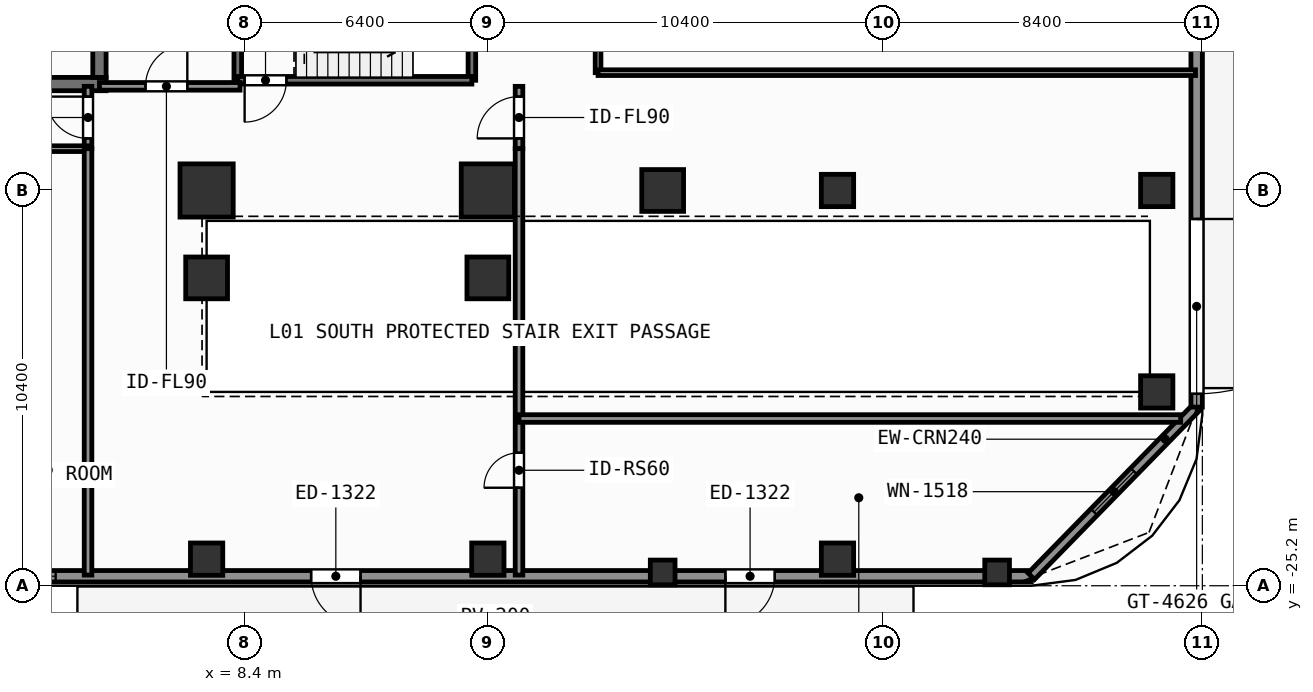
"""IFC4 building model, lengths in metres.
Left out: names, types, materials, properties, quantities, classifications, styles, units other than length and angle.
Written with IfcOpenShell. Run it as: python <this file> out.ifc"""

import sys

from ifc_helpers import new_model, si_unit, direction, frame, frame_2d, origin, origin_2d, place, context, subcontext, project, spatial, rectangle, extrude, element, fill, save


model = new_model("IFC4")
c1 = context("Model", 3, precision=1e-05, world=origin(), true_north=direction((0.0, 1.0)))
c2 = subcontext(c1, "Body", "Model", "MODEL_VIEW")
j1 = project(units=[si_unit("LENGTHUNIT", "METRE"), si_unit("PLANEANGLEUNIT", "RADIAN")], contexts=[c1])
p1 = place(None, origin())
s1 = spatial("IfcSite", under=j1, at=p1, CompositionType="ELEMENT")
p2 = place(p1, origin())
s2 = spatial("IfcBuilding", under=s1, at=p2, CompositionType="ELEMENT")
p3 = place(p2, origin())
s3 = spatial("IfcBuildingStorey", under=s2, at=p3, CompositionType="ELEMENT", Elevation=0.0)
p4 = place(p3, frame((-2.555, -12.0, 0.0), z_axis=(0.0, 0.0, 1.0), x_axis=(1.0, 0.0, 0.0)))
e1 = element("IfcWall", 1, at=p4, inside=s3, PredefinedType="SHEAR", context=c2, shape_type="SweptSolid", body=[
    extrude(rectangle(XDim=7.31, YDim=0.35, at=frame_2d((3.655, 0.0))), origin(), (0.0, 0.0, 1.0), 4.8),
])
p5 = place(p3, frame((4.58, -8.9, 0.0), z_axis=(0.0, 0.0, 1.0), x_axis=(0.0, -1.0, 0.0)))
e2 = element("IfcWall", 2, at=p5, inside=s3, PredefinedType="SHEAR", context=c2, shape_type="SweptSolid", body=[
    extrude(rectangle(XDim=2.925, YDim=0.35, at=frame_2d((1.462, 0.0))), origin(), (0.0, 0.0, 1.0), 4.8),
])
p6 = place(p5, frame((0.913, 0.0, 0.0)))
e3 = element("IfcOpeningElement", 3, at=p6, cuts=e2, PredefinedType="OPENING", context=c2, shape_type="SweptSolid", body=[
    extrude(rectangle(XDim=1.1, YDim=2.15, at=frame_2d((0.55, 1.075))), frame((0.0, 0.185, 0.0), z_axis=(0.0, -1.0, 0.0), x_axis=(1.0, 0.0, 0.0)), (0.0, 0.0, 1.0), 0.37),
])
for number, where, z_axis, x_axis in (
    (4, (7.4, -14.8, 0.0), (0.0, 0.0, 1.0), (1.0, 0.0, 0.0)),
    (5, (14.8, -14.8, 0.0), (0.0, 0.0, 1.0), (1.0, 0.0, 0.0)),
):
    element("IfcColumn", number, at=place(p3, frame(where, z_axis=z_axis, x_axis=x_axis)), inside=s3, PredefinedType="COLUMN", context=c2, shape_type="SweptSolid", body=[
        extrude(rectangle(XDim=1.4, YDim=1.4, at=origin_2d()), origin(), (0.0, 0.0, 1.0), 4.8),
    ])
for number, where, z_axis, x_axis in (
    (6, (19.4, -14.8, 0.0), (0.0, 0.0, 1.0), (1.0, 0.0, 0.0)),
    (7, (7.4, -17.1, 0.0), (0.0, 0.0, 1.0), (1.0, 0.0, 0.0)),
    (8, (14.8, -17.1, 0.0), (0.0, 0.0, 1.0), (1.0, 0.0, 0.0)),
):
    element("IfcColumn", number, at=place(p3, frame(where, z_axis=z_axis, x_axis=x_axis)), inside=s3, PredefinedType="COLUMN", context=c2, shape_type="SweptSolid", body=[
        extrude(rectangle(XDim=1.1, YDim=1.1, at=origin_2d()), origin(), (0.0, 0.0, 1.0), 4.8),
    ])
for number, where, z_axis, x_axis in (
    (9, (7.4, -24.5, 0.0), (0.0, 0.0, 1.0), (1.0, 0.0, 0.0)),
    (10, (14.8, -24.5, 0.0), (0.0, 0.0, 1.0), (1.0, 0.0, 0.0)),
    (11, (24.0, -24.5, 0.0), (0.0, 0.0, 1.0), (1.0, 0.0, 0.0)),
    (12, (24.0, -14.8, 0.0), (0.0, 0.0, 1.0), (1.0, 0.0, 0.0)),
    (13, (32.4, -14.8, 0.0), (0.0, 0.0, 1.0), (1.0, 0.0, 0.0)),
    (14, (32.4, -20.1, 0.0), (0.0, 0.0, 1.0), (1.0, 0.0, 0.0)),
):
    element("IfcColumn", number, at=place(p3, frame(where, z_axis=z_axis, x_axis=x_axis)), inside=s3, PredefinedType="COLUMN", context=c2, shape_type="SweptSolid", body=[
        extrude(rectangle(XDim=0.85, YDim=0.85, at=origin_2d()), origin(), (0.0, 0.0, 1.0), 4.8),
    ])
for number, where, z_axis, x_axis in (
    (15, (19.4, -24.85, 0.0), (0.0, 0.0, 1.0), (1.0, 0.0, 0.0)),
    (16, (28.2, -24.85, 0.0), (0.0, 0.0, 1.0), (1.0, 0.0, 0.0)),
):
    element("IfcColumn", number, at=place(p3, frame(where, z_axis=z_axis, x_axis=x_axis)), inside=s3, PredefinedType="PILASTER", context=c2, shape_type="SweptSolid", body=[
        extrude(rectangle(XDim=0.65, YDim=0.65, at=origin_2d()), origin(), (0.0, 0.0, 1.0), 4.8),
    ])
p7 = place(p3, frame((29.1, -24.95, 0.0), z_axis=(0.0, 0.0, 1.0), x_axis=(-1.0, 0.0, 0.0)))
e17 = element("IfcWall", 17, at=p7, inside=s3, PredefinedType="SOLIDWALL", context=c2, shape_type="SweptSolid", body=[
    extrude(rectangle(XDim=58.2, YDim=0.3, at=frame_2d((29.1, 0.0))), origin(), (0.0, 0.0, 1.0), 4.56),
])
p8 = place(p7, frame((39.26, 0.0, 0.85)))
e18 = element("IfcOpeningElement", 18, at=p8, cuts=e17, PredefinedType="OPENING", context=c2, shape_type="SweptSolid", body=[
    extrude(rectangle(XDim=2.1, YDim=2.2, at=frame_2d((1.05, 1.1))), frame((0.0, 0.16, 0.0), z_axis=(0.0, -1.0, 0.0), x_axis=(1.0, 0.0, 0.0)), (0.0, 0.0, 1.0), 0.32),
])
p9 = place(p7, frame((31.75, 0.0, 0.85)))
e19 = element("IfcOpeningElement", 19, at=p9, cuts=e17, PredefinedType="OPENING", context=c2, shape_type="SweptSolid", body=[
    extrude(rectangle(XDim=2.1, YDim=2.2, at=frame_2d((1.05, 1.1))), frame((0.0, 0.16, 0.0), z_axis=(0.0, -1.0, 0.0), x_axis=(1.0, 0.0, 0.0)), (0.0, 0.0, 1.0), 0.32),
])
p10 = place(p7, frame((25.672, 0.0, 0.85)))
e20 = element("IfcOpeningElement", 20, at=p10, cuts=e17, PredefinedType="OPENING", context=c2, shape_type="SweptSolid", body=[
    extrude(rectangle(XDim=2.1, YDim=2.2, at=frame_2d((1.05, 1.1))), frame((0.0, 0.16, 0.0), z_axis=(0.0, -1.0, 0.0), x_axis=(1.0, 0.0, 0.0)), (0.0, 0.0, 1.0), 0.32),
])
p11 = place(p7, frame((17.65, 0.0, 0.0)))
e21 = element("IfcOpeningElement", 21, at=p11, cuts=e17, PredefinedType="OPENING", context=c2, shape_type="SweptSolid", body=[
    extrude(rectangle(XDim=1.3, YDim=2.2, at=frame_2d((0.65, 1.1))), frame((0.0, 0.16, 0.0), z_axis=(0.0, -1.0, 0.0), x_axis=(1.0, 0.0, 0.0)), (0.0, 0.0, 1.0), 0.32),
])
p12 = place(p7, frame((6.75, 0.0, 0.0)))
e22 = element("IfcOpeningElement", 22, at=p12, cuts=e17, PredefinedType="OPENING", context=c2, shape_type="SweptSolid", body=[
    extrude(rectangle(XDim=1.3, YDim=2.2, at=frame_2d((0.65, 1.1))), frame((0.0, 0.16, 0.0), z_axis=(0.0, -1.0, 0.0), x_axis=(1.0, 0.0, 0.0)), (0.0, 0.0, 1.0), 0.32),
])
p13 = place(p7, frame((45.95, 0.0, 0.0)))
e23 = element("IfcOpeningElement", 23, at=p13, cuts=e17, PredefinedType="OPENING", context=c2, shape_type="SweptSolid", body=[
    extrude(rectangle(XDim=1.3, YDim=2.2, at=frame_2d((0.65, 1.1))), frame((0.0, 0.16, 0.0), z_axis=(0.0, -1.0, 0.0), x_axis=(1.0, 0.0, 0.0)), (0.0, 0.0, 1.0), 0.32),
])
p14 = place(p3, frame((33.45, -20.5, 0.0), z_axis=(0.0, 0.0, 1.0), x_axis=(-0.69901822973, -0.715103848756, 0.0)))
e24 = element("IfcWall", 24, at=p14, inside=s3, PredefinedType="SOLIDWALL", context=c2, shape_type="SweptSolid", body=[
    extrude(rectangle(XDim=6.223, YDim=0.24, at=frame_2d((3.111, 0.0))), origin(), (0.0, 0.0, 1.0), 4.56),
])
p15 = place(p14, frame((2.362, 0.0, 0.85)))
e25 = element("IfcOpeningElement", 25, at=p15, cuts=e24, PredefinedType="OPENING", context=c2, shape_type="SweptSolid", body=[
    extrude(rectangle(XDim=1.5, YDim=1.85, at=frame_2d((0.75, 0.925))), frame((0.0, 0.13, 0.0), z_axis=(0.0, -1.0, 0.0), x_axis=(1.0, 0.0, 0.0)), (0.0, 0.0, 1.0), 0.26),
])
p16 = place(p3, frame((33.45, 20.5, 0.0), z_axis=(0.0, 0.0, 1.0), x_axis=(0.0, -1.0, 0.0)))
e26 = element("IfcWall", 26, at=p16, inside=s3, PredefinedType="SOLIDWALL", context=c2, shape_type="SweptSolid", body=[
    extrude(rectangle(XDim=41.0, YDim=0.3, at=frame_2d((20.5, 0.0))), origin(), (0.0, 0.0, 1.0), 4.56),
])
p17 = place(p16, frame((23.1, 0.0, 0.0)))
e27 = element("IfcOpeningElement", 27, at=p17, cuts=e26, PredefinedType="OPENING", context=c2, shape_type="SweptSolid", body=[
    extrude(rectangle(XDim=2.0, YDim=2.4, at=frame_2d((1.0, 1.2))), frame((0.0, 0.16, 0.0), z_axis=(0.0, -1.0, 0.0), x_axis=(1.0, 0.0, 0.0)), (0.0, 0.0, 1.0), 0.32),
])
p18 = place(p16, frame((15.9, 0.0, 0.0)))
e28 = element("IfcOpeningElement", 28, at=p18, cuts=e26, PredefinedType="OPENING", context=c2, shape_type="SweptSolid", body=[
    extrude(rectangle(XDim=2.0, YDim=2.4, at=frame_2d((1.0, 1.2))), frame((0.0, 0.16, 0.0), z_axis=(0.0, -1.0, 0.0), x_axis=(1.0, 0.0, 0.0)), (0.0, 0.0, 1.0), 0.32),
])
p19 = place(p16, frame((36.05, 0.0, 0.0)))
e29 = element("IfcOpeningElement", 29, at=p19, cuts=e26, PredefinedType="OPENING", context=c2, shape_type="SweptSolid", body=[
    extrude(rectangle(XDim=4.6, YDim=2.6, at=frame_2d((2.3, 1.3))), frame((0.0, 0.16, 0.0), z_axis=(0.0, -1.0, 0.0), x_axis=(1.0, 0.0, 0.0)), (0.0, 0.0, 1.0), 0.32),
])
p20 = place(p16, frame((6.95, 0.0, 0.0)))
e30 = element("IfcOpeningElement", 30, at=p20, cuts=e26, PredefinedType="OPENING", context=c2, shape_type="SweptSolid", body=[
    extrude(rectangle(XDim=1.3, YDim=2.2, at=frame_2d((0.65, 1.1))), frame((0.0, 0.16, 0.0), z_axis=(0.0, -1.0, 0.0), x_axis=(1.0, 0.0, 0.0)), (0.0, 0.0, 1.0), 0.32),
])
for number, where, z_axis, x_axis in (
    (31, (8.22, -11.9, 0.0), (0.0, 0.0, 1.0), (0.0, 1.0, 0.0)),
    (32, (14.38, -8.94, 0.0), (0.0, 0.0, 1.0), (0.0, -1.0, 0.0)),
):
    element("IfcWall", number, at=place(p3, frame(where, z_axis=z_axis, x_axis=x_axis)), inside=s3, PredefinedType="SHEAR", context=c2, shape_type="SweptSolid", body=[
        extrude(rectangle(XDim=2.96, YDim=0.2, at=frame_2d((1.48, 0.0))), origin(), (0.0, 0.0, 1.0), 4.56),
    ])
p21 = place(p3, frame((14.38, -11.9, 0.0), z_axis=(0.0, 0.0, 1.0), x_axis=(-1.0, 0.0, 0.0)))
e33 = element("IfcWall", 33, at=p21, inside=s3, PredefinedType="SHEAR", context=c2, shape_type="SweptSolid", body=[
    extrude(rectangle(XDim=6.16, YDim=0.2, at=frame_2d((3.08, 0.0))), origin(), (0.0, 0.0, 1.0), 4.56),
])
p22 = place(p21, frame((4.88, 0.0, 0.0)))
e34 = element("IfcOpeningElement", 34, at=p22, cuts=e33, PredefinedType="OPENING", context=c2, shape_type="SweptSolid", body=[
    extrude(rectangle(XDim=1.1, YDim=2.15, at=frame_2d((0.55, 1.075))), frame((0.0, 0.11, 0.0), z_axis=(0.0, -1.0, 0.0), x_axis=(1.0, 0.0, 0.0)), (0.0, 0.0, 1.0), 0.22),
])
p23 = place(p3, frame((4.58, -12.06, 0.0), z_axis=(0.0, 0.0, 1.0), x_axis=(1.0, 0.0, 0.0)))
e35 = element("IfcWall", 35, at=p23, inside=s3, PredefinedType="SOLIDWALL", context=c2, shape_type="SweptSolid", body=[
    extrude(rectangle(XDim=3.7, YDim=0.2, at=frame_2d((1.85, 0.0))), origin(), (0.0, 0.0, 1.0), 4.56),
])
p24 = place(p23, frame((1.212, 0.0, 0.0)))
e36 = element("IfcOpeningElement", 36, at=p24, cuts=e35, PredefinedType="OPENING", context=c2, shape_type="SweptSolid", body=[
    extrude(rectangle(XDim=1.1, YDim=2.15, at=frame_2d((0.55, 1.075))), frame((0.0, 0.11, 0.0), z_axis=(0.0, -1.0, 0.0), x_axis=(1.0, 0.0, 0.0)), (0.0, 0.0, 1.0), 0.22),
])
p25 = place(p3, frame((4.28, -13.7, 0.0), z_axis=(0.0, 0.0, 1.0), x_axis=(0.0, 1.0, 0.0)))
e37 = element("IfcWall", 37, at=p25, inside=s3, PredefinedType="SOLIDWALL", context=c2, shape_type="SweptSolid", body=[
    extrude(rectangle(XDim=1.64, YDim=0.2, at=frame_2d((0.82, 0.0))), origin(), (0.0, 0.0, 1.0), 4.56),
])
p26 = place(p25, frame((0.27, 0.0, 0.0)))
e38 = element("IfcOpeningElement", 38, at=p26, cuts=e37, PredefinedType="OPENING", context=c2, shape_type="SweptSolid", body=[
    extrude(rectangle(XDim=1.1, YDim=2.15, at=frame_2d((0.55, 1.075))), frame((0.0, 0.11, 0.0), z_axis=(0.0, -1.0, 0.0), x_axis=(1.0, 0.0, 0.0)), (0.0, 0.0, 1.0), 0.22),
])
p27 = place(p3, frame((15.62, -13.7, 0.0), z_axis=(0.0, 0.0, 1.0), x_axis=(0.0, 1.0, 0.0)))
e39 = element("IfcWall", 39, at=p27, inside=s3, PredefinedType="SOLIDWALL", context=c2, shape_type="SweptSolid", body=[
    extrude(rectangle(XDim=1.64, YDim=0.2, at=frame_2d((0.82, 0.0))), origin(), (0.0, 0.0, 1.0), 4.56),
])
p28 = place(p27, frame((0.27, 0.0, 0.0)))
e40 = element("IfcOpeningElement", 40, at=p28, cuts=e39, PredefinedType="OPENING", context=c2, shape_type="SweptSolid", body=[
    extrude(rectangle(XDim=1.1, YDim=2.15, at=frame_2d((0.55, 1.075))), frame((0.0, 0.11, 0.0), z_axis=(0.0, -1.0, 0.0), x_axis=(1.0, 0.0, 0.0)), (0.0, 0.0, 1.0), 0.22),
])
p29 = place(p3, frame((-8.12, -13.7, 0.0), z_axis=(0.0, 0.0, 1.0), x_axis=(1.0, 0.0, 0.0)))
e41 = element("IfcWall", 41, at=p29, inside=s3, PredefinedType="PARTITIONING", context=c2, shape_type="SweptSolid", body=[
    extrude(rectangle(XDim=12.4, YDim=0.15, at=frame_2d((6.2, 0.0))), origin(), (0.0, 0.0, 1.0), 4.56),
])
p30 = place(p29, frame((5.661, 0.0, 0.0)))
e42 = element("IfcOpeningElement", 42, at=p30, cuts=e41, PredefinedType="OPENING", context=c2, shape_type="SweptSolid", body=[
    extrude(rectangle(XDim=0.9, YDim=2.1, at=frame_2d((0.45, 1.05))), frame((0.0, 0.085, 0.0), z_axis=(0.0, -1.0, 0.0), x_axis=(1.0, 0.0, 0.0)), (0.0, 0.0, 1.0), 0.17),
])
p31 = place(p3, frame((15.62, -24.92, 0.0), z_axis=(0.0, 0.0, 1.0), x_axis=(0.0, 1.0, 0.0)))
e43 = element("IfcWall", 43, at=p31, inside=s3, PredefinedType="SOLIDWALL", context=c2, shape_type="SweptSolid", body=[
    extrude(rectangle(XDim=11.22, YDim=0.2, at=frame_2d((5.61, 0.0))), origin(), (0.0, 0.0, 1.0), 4.56),
])
p32 = place(p31, frame((2.299, 0.0, 0.0)))
e44 = element("IfcOpeningElement", 44, at=p32, cuts=e43, PredefinedType="OPENING", context=c2, shape_type="SweptSolid", body=[
    extrude(rectangle(XDim=0.92, YDim=2.1, at=frame_2d((0.46, 1.05))), frame((0.0, 0.11, 0.0), z_axis=(0.0, -1.0, 0.0), x_axis=(1.0, 0.0, 0.0)), (0.0, 0.0, 1.0), 0.22),
])
p33 = place(p3, frame((17.7, -11.7, 0.0), z_axis=(0.0, 0.0, 1.0), x_axis=(0.0, 1.0, 0.0)))
e45 = element("IfcWall", 45, at=p33, inside=s3, PredefinedType="PARTITIONING", context=c2, shape_type="SweptSolid", body=[
    extrude(rectangle(XDim=19.62, YDim=0.15, at=frame_2d((9.81, 0.0))), origin(), (0.0, 0.0, 1.0), 4.56),
])
p34 = place(p33, frame((8.921, 0.0, 0.0)))
e46 = element("IfcOpeningElement", 46, at=p34, cuts=e45, PredefinedType="OPENING", context=c2, shape_type="SweptSolid", body=[
    extrude(rectangle(XDim=1.6, YDim=2.3, at=frame_2d((0.8, 1.15))), frame((0.0, 0.085, 0.0), z_axis=(0.0, -1.0, 0.0), x_axis=(1.0, 0.0, 0.0)), (0.0, 0.0, 1.0), 0.17),
])
p35 = place(p3, frame((4.28, -24.92, 0.0), z_axis=(0.0, 0.0, 1.0), x_axis=(0.0, 1.0, 0.0)))
e47 = element("IfcWall", 47, at=p35, inside=s3, PredefinedType="SOLIDWALL", context=c2, shape_type="SweptSolid", body=[
    extrude(rectangle(XDim=11.22, YDim=0.2, at=frame_2d((5.61, 0.0))), origin(), (0.0, 0.0, 1.0), 4.56),
])
p36 = place(p3, frame((15.62, -20.8, 0.0), z_axis=(0.0, 0.0, 1.0), x_axis=(1.0, 0.0, 0.0)))
e48 = element("IfcWall", 48, at=p36, inside=s3, PredefinedType="SOLIDWALL", context=c2, shape_type="SweptSolid", body=[
    extrude(rectangle(XDim=17.41, YDim=0.2, at=frame_2d((8.705, 0.0))), origin(), (0.0, 0.0, 1.0), 4.56),
])
p37 = place(p3, frame((17.7, -11.7, 0.0), z_axis=(0.0, 0.0, 1.0), x_axis=(1.0, 0.0, 0.0)))
e49 = element("IfcWall", 49, at=p37, inside=s3, PredefinedType="PARTITIONING", context=c2, shape_type="SweptSolid", body=[
    extrude(rectangle(XDim=15.72, YDim=0.15, at=frame_2d((7.86, 0.0))), origin(), (0.0, 0.0, 1.0), 4.56),
])
p38 = place(p15, origin())
e50 = element("IfcWindow", 50, at=p38, inside=s3, PartitioningType="SINGLE_PANEL", PredefinedType="WINDOW", context=c2, shape_type="SweptSolid", body=[
    extrude(rectangle(XDim=1.5, YDim=1.85, at=frame_2d((0.75, 0.925))), frame((0.0, 0.03, 0.0), z_axis=(0.0, -1.0, 0.0), x_axis=(1.0, 0.0, 0.0)), (0.0, 0.0, 1.0), 0.06),
])
fill(e25, e50)
p39 = place(p10, origin())
e51 = element("IfcWindow", 51, at=p39, inside=s3, PartitioningType="SINGLE_PANEL", PredefinedType="WINDOW", context=c2, shape_type="SweptSolid", body=[
    extrude(rectangle(XDim=2.1, YDim=2.2, at=frame_2d((1.05, 1.1))), frame((0.0, 0.03, 0.0), z_axis=(0.0, -1.0, 0.0), x_axis=(1.0, 0.0, 0.0)), (0.0, 0.0, 1.0), 0.06),
])
fill(e20, e51)
p40 = place(p19, origin())
e52 = element("IfcDoor", 52, at=p40, inside=s3, OperationType="SINGLE_SWING_LEFT", PredefinedType="GATE", context=c2, shape_type="SweptSolid", body=[
    extrude(rectangle(XDim=4.6, YDim=2.6, at=frame_2d((2.3, 1.3))), frame((0.0, 0.025, 0.0), z_axis=(0.0, -1.0, 0.0), x_axis=(1.0, 0.0, 0.0)), (0.0, 0.0, 1.0), 0.05),
])
fill(e29, e52)
p41 = place(p11, origin())
e53 = element("IfcDoor", 53, at=p41, inside=s3, OperationType="SINGLE_SWING_LEFT", PredefinedType="DOOR", context=c2, shape_type="SweptSolid", body=[
    extrude(rectangle(XDim=1.3, YDim=2.2, at=frame_2d((0.65, 1.1))), frame((0.0, 0.025, 0.0), z_axis=(0.0, -1.0, 0.0), x_axis=(1.0, 0.0, 0.0)), (0.0, 0.0, 1.0), 0.05),
])
fill(e21, e53)
p42 = place(p12, origin())
e54 = element("IfcDoor", 54, at=p42, inside=s3, OperationType="SINGLE_SWING_RIGHT", PredefinedType="DOOR", context=c2, shape_type="SweptSolid", body=[
    extrude(rectangle(XDim=1.3, YDim=2.2, at=frame_2d((0.65, 1.1))), frame((0.0, 0.025, 0.0), z_axis=(0.0, -1.0, 0.0), x_axis=(1.0, 0.0, 0.0)), (0.0, 0.0, 1.0), 0.05),
])
fill(e22, e54)
p43 = place(p22, origin())
e55 = element("IfcDoor", 55, at=p43, inside=s3, OperationType="SINGLE_SWING_RIGHT", PredefinedType="DOOR", context=c2, shape_type="SweptSolid", body=[
    extrude(rectangle(XDim=1.1, YDim=2.15, at=frame_2d((0.55, 1.075))), frame((0.0, 0.025, 0.0), z_axis=(0.0, -1.0, 0.0), x_axis=(1.0, 0.0, 0.0)), (0.0, 0.0, 1.0), 0.05),
])
fill(e34, e55)
p44 = place(p24, origin())
e56 = element("IfcDoor", 56, at=p44, inside=s3, OperationType="SINGLE_SWING_RIGHT", PredefinedType="DOOR", context=c2, shape_type="SweptSolid", body=[
    extrude(rectangle(XDim=1.1, YDim=2.15, at=frame_2d((0.55, 1.075))), frame((0.0, 0.025, 0.0), z_axis=(0.0, -1.0, 0.0), x_axis=(1.0, 0.0, 0.0)), (0.0, 0.0, 1.0), 0.05),
])
fill(e36, e56)
p45 = place(p26, origin())
e57 = element("IfcDoor", 57, at=p45, inside=s3, OperationType="SINGLE_SWING_RIGHT", PredefinedType="DOOR", context=c2, shape_type="SweptSolid", body=[
    extrude(rectangle(XDim=1.1, YDim=2.15, at=frame_2d((0.55, 1.075))), frame((0.0, 0.025, 0.0), z_axis=(0.0, -1.0, 0.0), x_axis=(1.0, 0.0, 0.0)), (0.0, 0.0, 1.0), 0.05),
])
fill(e38, e57)
p46 = place(p28, origin())
e58 = element("IfcDoor", 58, at=p46, inside=s3, OperationType="SINGLE_SWING_LEFT", PredefinedType="DOOR", context=c2, shape_type="SweptSolid", body=[
    extrude(rectangle(XDim=1.1, YDim=2.15, at=frame_2d((0.55, 1.075))), frame((0.0, 0.025, 0.0), z_axis=(0.0, -1.0, 0.0), x_axis=(1.0, 0.0, 0.0)), (0.0, 0.0, 1.0), 0.05),
])
fill(e40, e58)
p47 = place(p32, origin())
e59 = element("IfcDoor", 59, at=p47, inside=s3, OperationType="SINGLE_SWING_LEFT", PredefinedType="DOOR", context=c2, shape_type="SweptSolid", body=[
    extrude(rectangle(XDim=0.92, YDim=2.1, at=frame_2d((0.46, 1.05))), frame((0.0, 0.025, 0.0), z_axis=(0.0, -1.0, 0.0), x_axis=(1.0, 0.0, 0.0)), (0.0, 0.0, 1.0), 0.05),
])
fill(e44, e59)
save(model, sys.argv[1])
